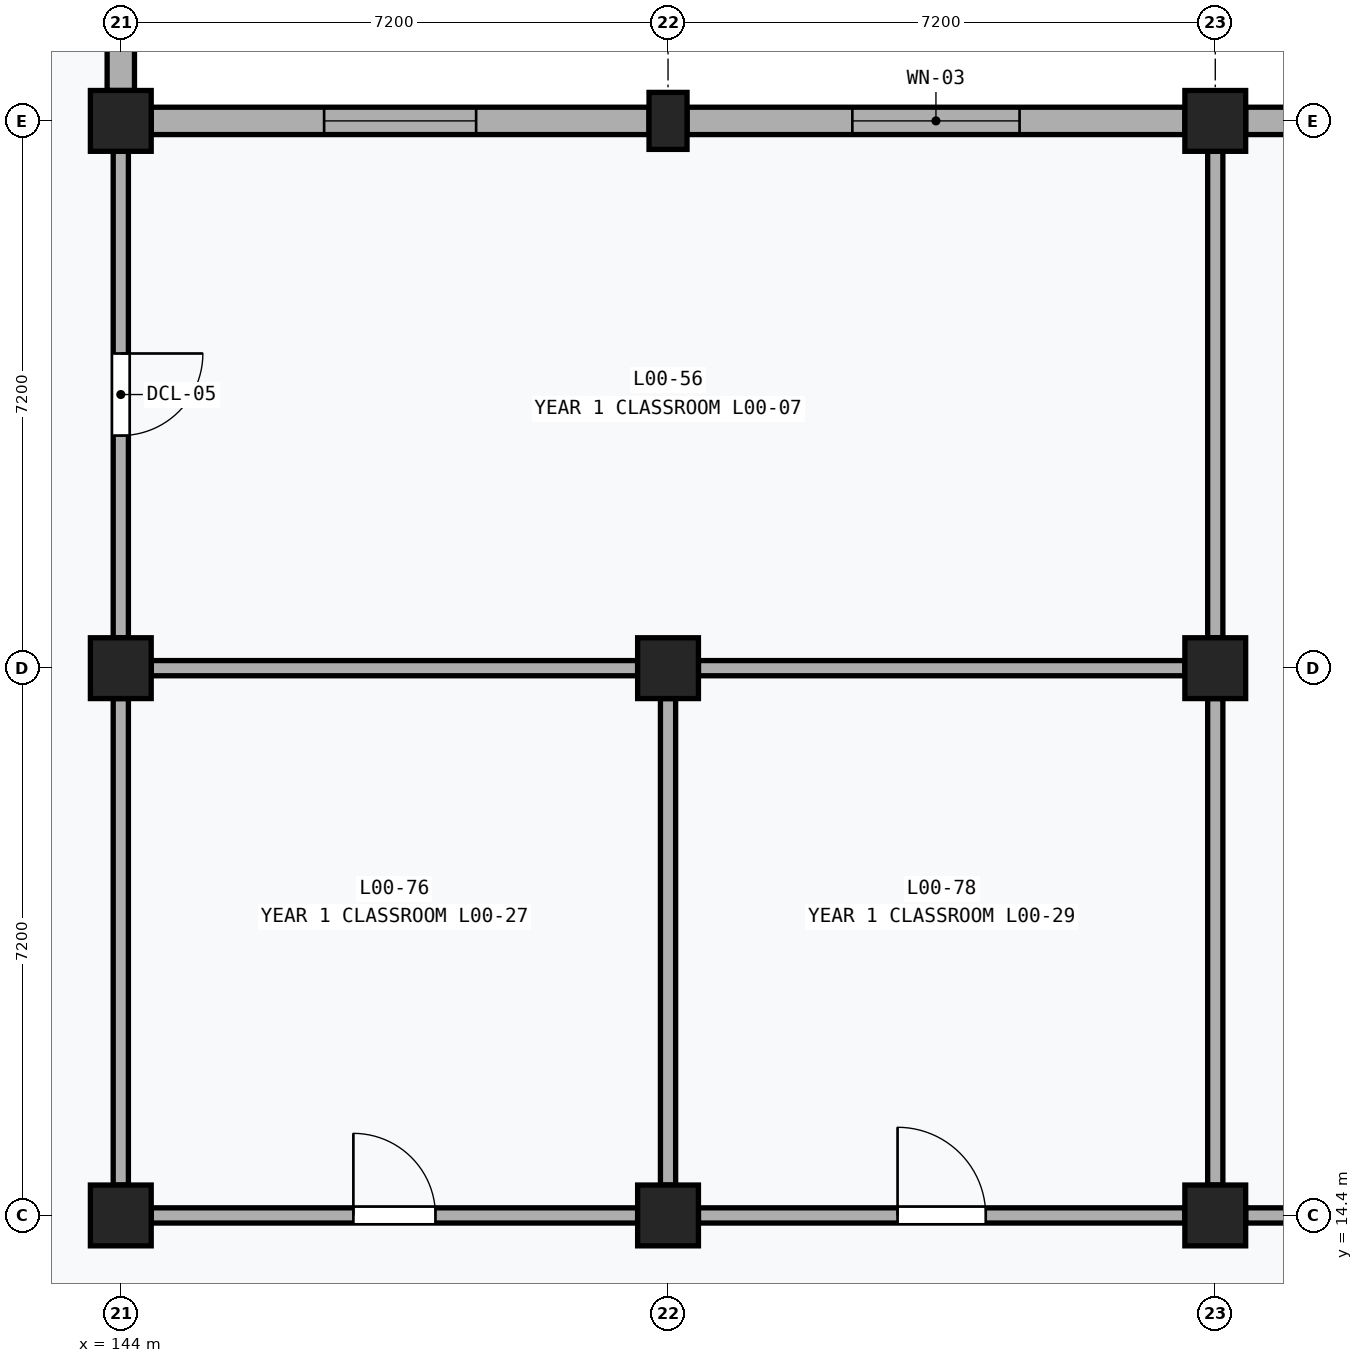
"""IFC4 building model, lengths in metres.
Left out: names, types, materials, properties, quantities, classifications, styles, units other than length and angle.
Written with IfcOpenShell. Run it as: python <this file> out.ifc"""

import sys

from ifc_helpers import new_model, si_unit, direction, frame, frame_2d, origin, origin_2d, place, context, subcontext, project, spatial, rectangle, extrude, element, fill, save


model = new_model("IFC4")
c1 = context("Model", 3, precision=1e-05, world=origin(), true_north=direction((0.0, 1.0)))
c2 = subcontext(c1, "Body", "Model", "MODEL_VIEW")
j1 = project(units=[si_unit("LENGTHUNIT", "METRE"), si_unit("PLANEANGLEUNIT", "RADIAN")], contexts=[c1])
p1 = place(None, origin())
s1 = spatial("IfcSite", under=j1, at=p1, CompositionType="ELEMENT")
p2 = place(p1, origin())
s2 = spatial("IfcBuilding", under=s1, at=p2, CompositionType="ELEMENT")
p3 = place(p2, origin())
s3 = spatial("IfcBuildingStorey", under=s2, at=p3, CompositionType="ELEMENT", Elevation=0.0)
for number, where, z_axis, x_axis in (
    (1, (144.0, 14.4, 0.0), (0.0, 0.0, 1.0), (1.0, 0.0, 0.0)),
    (2, (144.0, 21.6, 0.0), (0.0, 0.0, 1.0), (1.0, 0.0, 0.0)),
    (3, (144.0, 28.8, 0.0), (0.0, 0.0, 1.0), (1.0, 0.0, 0.0)),
    (4, (151.2, 14.4, 0.0), (0.0, 0.0, 1.0), (1.0, 0.0, 0.0)),
    (5, (151.2, 21.6, 0.0), (0.0, 0.0, 1.0), (1.0, 0.0, 0.0)),
):
    element("IfcColumn", number, at=place(p3, frame(where, z_axis=z_axis, x_axis=x_axis)), inside=s3, PredefinedType="COLUMN", context=c2, shape_type="SweptSolid", body=[
        extrude(rectangle(XDim=0.8, YDim=0.8, at=origin_2d()), origin(), (0.0, 0.0, 1.0), 4.8),
    ])
p4 = place(p3, frame((151.2, 28.8, 0.0), z_axis=(0.0, 0.0, 1.0), x_axis=(1.0, 0.0, 0.0)))
e6 = element("IfcColumn", 6, at=p4, inside=s3, PredefinedType="PILASTER", context=c2, shape_type="SweptSolid", body=[
    extrude(rectangle(XDim=0.5, YDim=0.75, at=origin_2d()), origin(), (0.0, 0.0, 1.0), 4.8),
])
for number, where, z_axis, x_axis in (
    (7, (158.4, 14.4, 0.0), (0.0, 0.0, 1.0), (1.0, 0.0, 0.0)),
    (8, (158.4, 21.6, 0.0), (0.0, 0.0, 1.0), (1.0, 0.0, 0.0)),
    (9, (158.4, 28.8, 0.0), (0.0, 0.0, 1.0), (1.0, 0.0, 0.0)),
):
    element("IfcColumn", number, at=place(p3, frame(where, z_axis=z_axis, x_axis=x_axis)), inside=s3, PredefinedType="COLUMN", context=c2, shape_type="SweptSolid", body=[
        extrude(rectangle(XDim=0.8, YDim=0.8, at=origin_2d()), origin(), (0.0, 0.0, 1.0), 4.8),
    ])
p5 = place(p3, frame((144.0, 29.2, 0.0), z_axis=(0.0, 0.0, 1.0), x_axis=(0.0, 1.0, 0.0)))
e10 = element("IfcWall", 10, at=p5, inside=s3, PredefinedType="SOLIDWALL", context=c2, shape_type="SweptSolid", body=[
    extrude(rectangle(XDim=6.425, YDim=0.36, at=frame_2d((3.212, 0.0))), origin(), (0.0, 0.0, 1.0), 3.89),
])
p6 = place(p5, frame((2.212, 0.0, 0.9)))
e11 = element("IfcOpeningElement", 11, at=p6, cuts=e10, PredefinedType="OPENING", context=c2, shape_type="SweptSolid", body=[
    extrude(rectangle(XDim=2.0, YDim=1.8, at=frame_2d((1.0, 0.9))), frame((0.0, 0.192, 0.0), z_axis=(0.0, -1.0, 0.0), x_axis=(1.0, 0.0, 0.0)), (0.0, 0.0, 1.0), 0.384),
])
p7 = place(p3, frame((144.4, 28.8, 0.0), z_axis=(0.0, 0.0, 1.0), x_axis=(1.0, 0.0, 0.0)))
e12 = element("IfcWall", 12, at=p7, inside=s3, PredefinedType="SOLIDWALL", context=c2, shape_type="SweptSolid", body=[
    extrude(rectangle(XDim=6.55, YDim=0.36, at=frame_2d((3.275, 0.0))), origin(), (0.0, 0.0, 1.0), 3.89),
])
p8 = place(p7, frame((2.275, 0.0, 0.9)))
e13 = element("IfcOpeningElement", 13, at=p8, cuts=e12, PredefinedType="OPENING", context=c2, shape_type="SweptSolid", body=[
    extrude(rectangle(XDim=2.0, YDim=1.8, at=frame_2d((1.0, 0.9))), frame((0.0, 0.192, 0.0), z_axis=(0.0, -1.0, 0.0), x_axis=(1.0, 0.0, 0.0)), (0.0, 0.0, 1.0), 0.384),
])
p9 = place(p3, frame((151.45, 28.8, 0.0), z_axis=(0.0, 0.0, 1.0), x_axis=(1.0, 0.0, 0.0)))
e14 = element("IfcWall", 14, at=p9, inside=s3, PredefinedType="SOLIDWALL", context=c2, shape_type="SweptSolid", body=[
    extrude(rectangle(XDim=6.55, YDim=0.36, at=frame_2d((3.275, 0.0))), origin(), (0.0, 0.0, 1.0), 3.89),
])
p10 = place(p9, frame((2.175, 0.0, 0.9)))
e15 = element("IfcOpeningElement", 15, at=p10, cuts=e14, PredefinedType="OPENING", context=c2, shape_type="SweptSolid", body=[
    extrude(rectangle(XDim=2.2, YDim=1.8, at=frame_2d((1.1, 0.9))), frame((0.0, 0.192, 0.0), z_axis=(0.0, -1.0, 0.0), x_axis=(1.0, 0.0, 0.0)), (0.0, 0.0, 1.0), 0.384),
])
p11 = place(p3, frame((158.8, 28.8, 0.0), z_axis=(0.0, 0.0, 1.0), x_axis=(1.0, 0.0, 0.0)))
e16 = element("IfcWall", 16, at=p11, inside=s3, PredefinedType="SOLIDWALL", context=c2, shape_type="SweptSolid", body=[
    extrude(rectangle(XDim=6.35, YDim=0.36, at=frame_2d((3.175, 0.0))), origin(), (0.0, 0.0, 1.0), 3.89),
])
p12 = place(p11, frame((2.275, 0.0, 0.0)))
e17 = element("IfcOpeningElement", 17, at=p12, cuts=e16, PredefinedType="OPENING", context=c2, shape_type="SweptSolid", body=[
    extrude(rectangle(XDim=1.8, YDim=2.35, at=frame_2d((0.9, 1.175))), frame((0.0, 0.192, 0.0), z_axis=(0.0, -1.0, 0.0), x_axis=(1.0, 0.0, 0.0)), (0.0, 0.0, 1.0), 0.384),
])
p13 = place(p3, frame((144.4, 21.6, 0.0), z_axis=(0.0, 0.0, 1.0), x_axis=(1.0, 0.0, 0.0)))
e18 = element("IfcWall", 18, at=p13, inside=s3, PredefinedType="PARTITIONING", context=c2, shape_type="SweptSolid", body=[
    extrude(rectangle(XDim=6.4, YDim=0.2, at=frame_2d((3.2, 0.0))), origin(), (0.0, 0.0, 1.0), 3.62),
])
p14 = place(p3, frame((144.0, 22.0, 0.0), z_axis=(0.0, 0.0, 1.0), x_axis=(0.0, 1.0, 0.0)))
e19 = element("IfcWall", 19, at=p14, inside=s3, PredefinedType="PARTITIONING", context=c2, shape_type="SweptSolid", body=[
    extrude(rectangle(XDim=6.4, YDim=0.2, at=frame_2d((3.2, 0.0))), origin(), (0.0, 0.0, 1.0), 3.62),
])
p15 = place(p14, frame((2.66, 0.0, 0.0)))
e20 = element("IfcOpeningElement", 20, at=p15, cuts=e19, PredefinedType="OPENING", context=c2, shape_type="SweptSolid", body=[
    extrude(rectangle(XDim=1.08, YDim=2.18, at=frame_2d((0.54, 1.09))), frame((0.0, 0.112, 0.0), z_axis=(0.0, -1.0, 0.0), x_axis=(1.0, 0.0, 0.0)), (0.0, 0.0, 1.0), 0.224),
])
for number, where, z_axis, x_axis in (
    (21, (151.6, 21.6, 0.0), (0.0, 0.0, 1.0), (1.0, 0.0, 0.0)),
    (22, (158.4, 22.0, 0.0), (0.0, 0.0, 1.0), (0.0, 1.0, 0.0)),
):
    element("IfcWall", number, at=place(p3, frame(where, z_axis=z_axis, x_axis=x_axis)), inside=s3, PredefinedType="PARTITIONING", context=c2, shape_type="SweptSolid", body=[
        extrude(rectangle(XDim=6.4, YDim=0.2, at=frame_2d((3.2, 0.0))), origin(), (0.0, 0.0, 1.0), 3.62),
    ])
p16 = place(p3, frame((158.8, 14.4, 0.0), z_axis=(0.0, 0.0, 1.0), x_axis=(1.0, 0.0, 0.0)))
e23 = element("IfcWall", 23, at=p16, inside=s3, PredefinedType="PARTITIONING", context=c2, shape_type="SweptSolid", body=[
    extrude(rectangle(XDim=6.35, YDim=0.2, at=frame_2d((3.175, 0.0))), origin(), (0.0, 0.0, 1.0), 3.62),
])
p17 = place(p16, frame((2.615, 0.0, 0.0)))
e24 = element("IfcOpeningElement", 24, at=p17, cuts=e23, PredefinedType="OPENING", context=c2, shape_type="SweptSolid", body=[
    extrude(rectangle(XDim=1.12, YDim=2.2, at=frame_2d((0.56, 1.1))), frame((0.0, 0.112, 0.0), z_axis=(0.0, -1.0, 0.0), x_axis=(1.0, 0.0, 0.0)), (0.0, 0.0, 1.0), 0.224),
])
p18 = place(p3, frame((158.4, 14.8, 0.0), z_axis=(0.0, 0.0, 1.0), x_axis=(0.0, 1.0, 0.0)))
e25 = element("IfcWall", 25, at=p18, inside=s3, PredefinedType="PARTITIONING", context=c2, shape_type="SweptSolid", body=[
    extrude(rectangle(XDim=6.4, YDim=0.2, at=frame_2d((3.2, 0.0))), origin(), (0.0, 0.0, 1.0), 3.62),
])
p19 = place(p3, frame((144.4, 14.4, 0.0), z_axis=(0.0, 0.0, 1.0), x_axis=(1.0, 0.0, 0.0)))
e26 = element("IfcWall", 26, at=p19, inside=s3, PredefinedType="PARTITIONING", context=c2, shape_type="SweptSolid", body=[
    extrude(rectangle(XDim=6.4, YDim=0.2, at=frame_2d((3.2, 0.0))), origin(), (0.0, 0.0, 1.0), 3.62),
])
p20 = place(p19, frame((2.66, 0.0, 0.0)))
e27 = element("IfcOpeningElement", 27, at=p20, cuts=e26, PredefinedType="OPENING", context=c2, shape_type="SweptSolid", body=[
    extrude(rectangle(XDim=1.08, YDim=2.18, at=frame_2d((0.54, 1.09))), frame((0.0, 0.112, 0.0), z_axis=(0.0, -1.0, 0.0), x_axis=(1.0, 0.0, 0.0)), (0.0, 0.0, 1.0), 0.224),
])
for number, where, z_axis, x_axis in (
    (28, (144.0, 14.8, 0.0), (0.0, 0.0, 1.0), (0.0, 1.0, 0.0)),
    (29, (151.2, 14.8, 0.0), (0.0, 0.0, 1.0), (0.0, 1.0, 0.0)),
):
    element("IfcWall", number, at=place(p3, frame(where, z_axis=z_axis, x_axis=x_axis)), inside=s3, PredefinedType="PARTITIONING", context=c2, shape_type="SweptSolid", body=[
        extrude(rectangle(XDim=6.4, YDim=0.2, at=frame_2d((3.2, 0.0))), origin(), (0.0, 0.0, 1.0), 3.62),
    ])
p21 = place(p3, frame((151.6, 14.4, 0.0), z_axis=(0.0, 0.0, 1.0), x_axis=(1.0, 0.0, 0.0)))
e30 = element("IfcWall", 30, at=p21, inside=s3, PredefinedType="PARTITIONING", context=c2, shape_type="SweptSolid", body=[
    extrude(rectangle(XDim=6.4, YDim=0.2, at=frame_2d((3.2, 0.0))), origin(), (0.0, 0.0, 1.0), 3.62),
])
p22 = place(p21, frame((2.62, 0.0, 0.0)))
e31 = element("IfcOpeningElement", 31, at=p22, cuts=e30, PredefinedType="OPENING", context=c2, shape_type="SweptSolid", body=[
    extrude(rectangle(XDim=1.16, YDim=2.22, at=frame_2d((0.58, 1.11))), frame((0.0, 0.112, 0.0), z_axis=(0.0, -1.0, 0.0), x_axis=(1.0, 0.0, 0.0)), (0.0, 0.0, 1.0), 0.224),
])
p23 = place(p8, origin())
e32 = element("IfcWindow", 32, at=p23, inside=s3, PartitioningType="SINGLE_PANEL", PredefinedType="WINDOW", context=c2, shape_type="SweptSolid", body=[
    extrude(rectangle(XDim=2.0, YDim=1.8, at=frame_2d((1.0, 0.9))), frame((0.0, 0.03, 0.0), z_axis=(0.0, -1.0, 0.0), x_axis=(1.0, 0.0, 0.0)), (0.0, 0.0, 1.0), 0.06),
])
fill(e13, e32)
p24 = place(p10, origin())
e33 = element("IfcWindow", 33, at=p24, inside=s3, PartitioningType="SINGLE_PANEL", PredefinedType="WINDOW", context=c2, shape_type="SweptSolid", body=[
    extrude(rectangle(XDim=2.2, YDim=1.8, at=frame_2d((1.1, 0.9))), frame((0.0, 0.03, 0.0), z_axis=(0.0, -1.0, 0.0), x_axis=(1.0, 0.0, 0.0)), (0.0, 0.0, 1.0), 0.06),
])
fill(e15, e33)
p25 = place(p15, frame((1.08, 0.0, 0.0), z_axis=(0.0, 0.0, 1.0), x_axis=(-1.0, 0.0, 0.0)))
e34 = element("IfcDoor", 34, at=p25, inside=s3, OperationType="SINGLE_SWING_LEFT", PredefinedType="DOOR", context=c2, shape_type="SweptSolid", body=[
    extrude(rectangle(XDim=1.08, YDim=2.18, at=frame_2d((0.54, 1.09))), frame((0.0, 0.025, 0.0), z_axis=(0.0, -1.0, 0.0), x_axis=(1.0, 0.0, 0.0)), (0.0, 0.0, 1.0), 0.05),
])
fill(e20, e34)
p26 = place(p20, origin())
e35 = element("IfcDoor", 35, at=p26, inside=s3, OperationType="SINGLE_SWING_LEFT", PredefinedType="DOOR", context=c2, shape_type="SweptSolid", body=[
    extrude(rectangle(XDim=1.08, YDim=2.18, at=frame_2d((0.54, 1.09))), frame((0.0, 0.025, 0.0), z_axis=(0.0, -1.0, 0.0), x_axis=(1.0, 0.0, 0.0)), (0.0, 0.0, 1.0), 0.05),
])
fill(e27, e35)
p27 = place(p22, origin())
e36 = element("IfcDoor", 36, at=p27, inside=s3, OperationType="SINGLE_SWING_LEFT", PredefinedType="DOOR", context=c2, shape_type="SweptSolid", body=[
    extrude(rectangle(XDim=1.16, YDim=2.22, at=frame_2d((0.58, 1.11))), frame((0.0, 0.025, 0.0), z_axis=(0.0, -1.0, 0.0), x_axis=(1.0, 0.0, 0.0)), (0.0, 0.0, 1.0), 0.05),
])
fill(e31, e36)
save(model, sys.argv[1])
